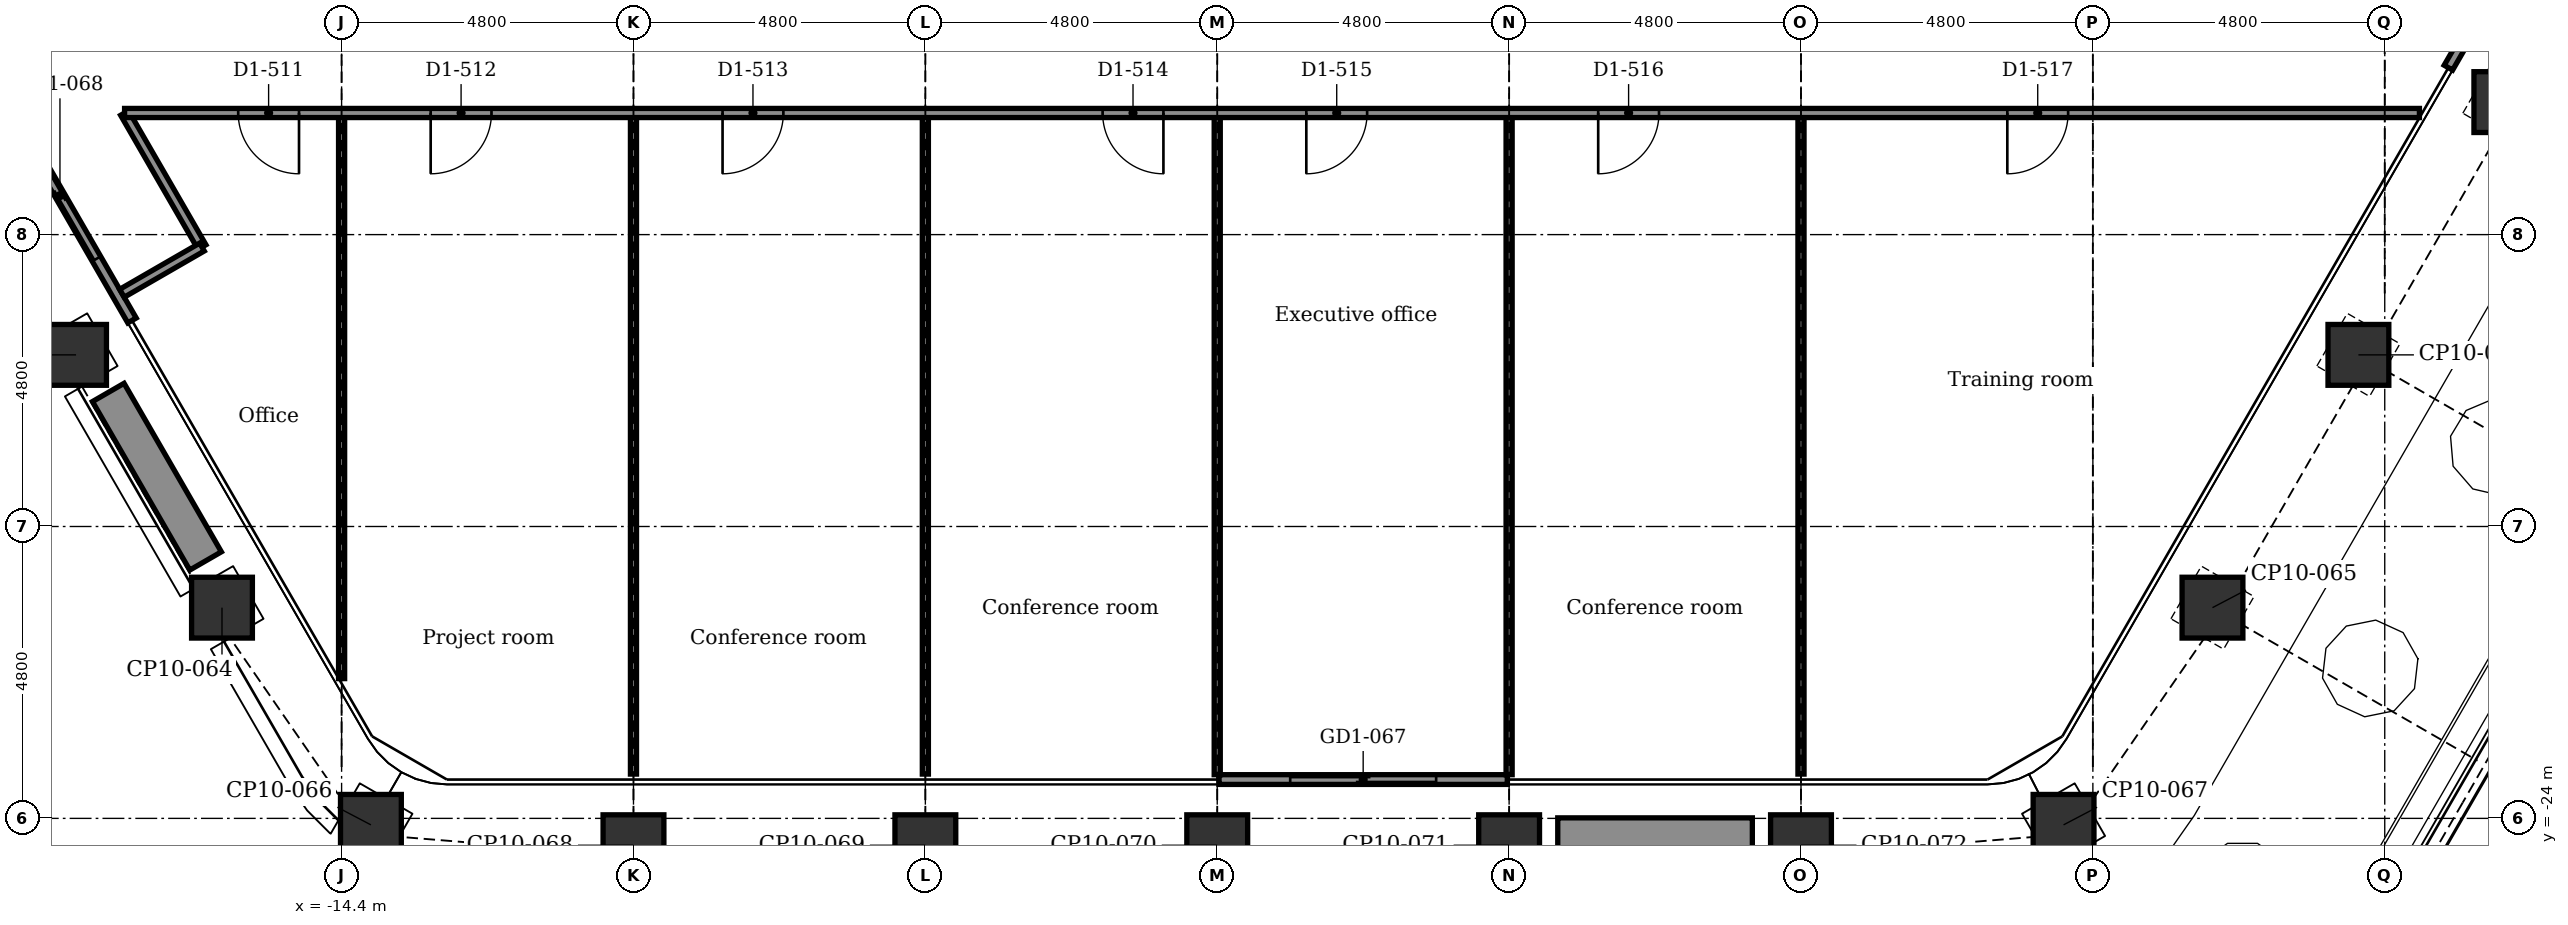
"""IFC4 building model, lengths in metres.
Left out: names, types, materials, properties, quantities, classifications, styles, units other than length and angle.
Written with IfcOpenShell. Run it as: python <this file> out.ifc"""

import sys

from ifc_helpers import new_model, si_unit, direction, frame, frame_2d, origin, origin_2d, place, context, subcontext, project, spatial, rectangle, extrude, element, fill, save


model = new_model("IFC4")
c1 = context("Model", 3, precision=1e-05, world=origin(), true_north=direction((0.0, 1.0)))
c2 = subcontext(c1, "Body", "Model", "MODEL_VIEW")
j1 = project(units=[si_unit("LENGTHUNIT", "METRE"), si_unit("PLANEANGLEUNIT", "RADIAN")], contexts=[c1])
p1 = place(None, origin())
s1 = spatial("IfcSite", under=j1, at=p1, CompositionType="ELEMENT")
p2 = place(p1, origin())
s2 = spatial("IfcBuilding", under=s1, at=p2, CompositionType="ELEMENT")
p3 = place(p2, frame((0.0, 0.0, 181.7)))
s3 = spatial("IfcBuildingStorey", under=s2, at=p3, CompositionType="ELEMENT", Elevation=181.7)
for number, where, z_axis, x_axis in (
    (1, (21.167, -12.221, -0.15), (0.0, 0.0, 1.0), (0.5, 0.866, 0.0)),
    (2, (18.767, -16.378, -0.15), (0.0, 0.0, 1.0), (0.5, 0.866, 0.0)),
    (3, (16.367, -20.535, -0.15), (0.0, 0.0, 1.0), (0.5, 0.866, 0.0)),
    (4, (13.918, -24.107, -0.15), (0.0, 0.0, 1.0), (0.866, 0.5, 0.0)),
    (5, (9.6, -24.442, -0.15), (0.0, 0.0, 1.0), (1.0, 0.0, 0.0)),
    (6, (4.8, -24.442, -0.15), (0.0, 0.0, 1.0), (1.0, 0.0, 0.0)),
    (7, (0.0, -24.442, -0.15), (0.0, 0.0, 1.0), (1.0, 0.0, 0.0)),
    (8, (-4.8, -24.442, -0.15), (0.0, 0.0, 1.0), (1.0, 0.0, 0.0)),
    (9, (-9.6, -24.442, -0.15), (0.0, 0.0, 1.0), (1.0, 0.0, 0.0)),
    (10, (-13.918, -24.107, -0.15), (0.0, 0.0, 1.0), (0.5, 0.866, 0.0)),
    (11, (-16.367, -20.535, -0.15), (0.0, 0.0, 1.0), (0.866, 0.5, 0.0)),
    (12, (-18.767, -16.378, -0.15), (0.0, 0.0, 1.0), (0.866, 0.5, 0.0)),
):
    element("IfcColumn", number, at=place(p3, frame(where, z_axis=z_axis, x_axis=x_axis)), inside=s3, PredefinedType="COLUMN", context=c2, shape_type="SweptSolid", body=[
        extrude(rectangle(XDim=1.0, YDim=1.0, at=origin_2d()), origin(), (0.0, 0.0, 1.0), 3.9),
    ])
p4 = place(p3, frame((22.617, -7.55, 0.0), z_axis=(0.0, 0.0, 1.0), x_axis=(-0.5000167099, -0.866015756104, 0.0)))
e13 = element("IfcWall", 13, at=p4, inside=s3, PredefinedType="PARTITIONING", context=c2, shape_type="SweptSolid", body=[
    extrude(rectangle(XDim=4.74, YDim=0.16, at=frame_2d((2.37, 0.0))), origin(), (0.0, 0.0, 1.0), 3.75),
])
p5 = place(p4, frame((1.17, 0.0, 0.0)))
e14 = element("IfcOpeningElement", 14, at=p5, cuts=e13, PredefinedType="OPENING", context=c2, shape_type="SweptSolid", body=[
    extrude(rectangle(XDim=2.4, YDim=2.4, at=frame_2d((1.2, 1.2))), frame((0.0, 0.09, 0.0), z_axis=(0.0, -1.0, 0.0), x_axis=(1.0, 0.0, 0.0)), (0.0, 0.0, 1.0), 0.18),
])
p6 = place(p3, frame((4.77, -23.362, 0.0), z_axis=(0.0, 0.0, 1.0), x_axis=(-1.0, 0.0, 0.0)))
e15 = element("IfcWall", 15, at=p6, inside=s3, PredefinedType="PARTITIONING", context=c2, shape_type="SweptSolid", body=[
    extrude(rectangle(XDim=4.74, YDim=0.16, at=frame_2d((2.37, 0.0))), origin(), (0.0, 0.0, 1.0), 3.75),
])
p7 = place(p6, frame((1.17, 0.0, 0.0)))
e16 = element("IfcOpeningElement", 16, at=p7, cuts=e15, PredefinedType="OPENING", context=c2, shape_type="SweptSolid", body=[
    extrude(rectangle(XDim=2.4, YDim=2.4, at=frame_2d((1.2, 1.2))), frame((0.0, 0.09, 0.0), z_axis=(0.0, -1.0, 0.0), x_axis=(1.0, 0.0, 0.0)), (0.0, 0.0, 1.0), 0.18),
])
p8 = place(p3, frame((-17.847, -15.812, 0.0), z_axis=(0.0, 0.0, 1.0), x_axis=(-0.5000167099, 0.866015756104, 0.0)))
e17 = element("IfcWall", 17, at=p8, inside=s3, PredefinedType="PARTITIONING", context=c2, shape_type="SweptSolid", body=[
    extrude(rectangle(XDim=4.74, YDim=0.16, at=frame_2d((2.37, 0.0))), origin(), (0.0, 0.0, 1.0), 3.75),
])
p9 = place(p8, frame((1.17, 0.0, 0.0)))
e18 = element("IfcOpeningElement", 18, at=p9, cuts=e17, PredefinedType="OPENING", context=c2, shape_type="SweptSolid", body=[
    extrude(rectangle(XDim=2.4, YDim=2.4, at=frame_2d((1.2, 1.2))), frame((0.0, 0.09, 0.0), z_axis=(0.0, -1.0, 0.0), x_axis=(1.0, 0.0, 0.0)), (0.0, 0.0, 1.0), 0.18),
])
for number, where, z_axis, x_axis in (
    (19, (8.8, -24.292, 0.0), (0.0, 0.0, 1.0), (-1.0, 0.0, 0.0)),
    (20, (-16.637, -19.767, 0.0), (0.0, 0.0, 1.0), (-0.5, 0.866, 0.0)),
):
    element("IfcWall", number, at=place(p3, frame(where, z_axis=z_axis, x_axis=x_axis)), inside=s3, PredefinedType="USERDEFINED", context=c2, shape_type="SweptSolid", body=[
        extrude(rectangle(XDim=3.2, YDim=0.6, at=frame_2d((1.6, 0.0))), origin(), (0.0, 0.0, 1.0), 0.7),
    ])
p10 = place(p3, frame((9.6, -23.271, 0.0), z_axis=(0.0, 0.0, 1.0), x_axis=(0.0, 1.0, 0.0)))
e21 = element("IfcWall", 21, at=p10, inside=s3, PredefinedType="PARTITIONING", context=c2, shape_type="SweptSolid", body=[
    extrude(rectangle(XDim=10.872, YDim=0.1, at=frame_2d((5.436, 0.0))), origin(), (0.0, 0.0, 1.0), 3.066),
])
for number, where, z_axis, x_axis in (
    (22, (4.8, -23.281, 0.0), (0.0, 0.0, 1.0), (0.0, 1.0, 0.0)),
    (23, (0.0, -23.281, 0.0), (0.0, 0.0, 1.0), (0.0, 1.0, 0.0)),
):
    element("IfcWall", number, at=place(p3, frame(where, z_axis=z_axis, x_axis=x_axis)), inside=s3, PredefinedType="PARTITIONING", context=c2, shape_type="SweptSolid", body=[
        extrude(rectangle(XDim=10.882, YDim=0.1, at=frame_2d((5.441, 0.0))), origin(), (0.0, 0.0, 1.0), 3.066),
    ])
for number, where, z_axis, x_axis in (
    (24, (-4.8, -23.271, 0.0), (0.0, 0.0, 1.0), (0.0, 1.0, 0.0)),
    (25, (-9.6, -23.271, 0.0), (0.0, 0.0, 1.0), (0.0, 1.0, 0.0)),
):
    element("IfcWall", number, at=place(p3, frame(where, z_axis=z_axis, x_axis=x_axis)), inside=s3, PredefinedType="PARTITIONING", context=c2, shape_type="SweptSolid", body=[
        extrude(rectangle(XDim=10.872, YDim=0.1, at=frame_2d((5.436, 0.0))), origin(), (0.0, 0.0, 1.0), 3.066),
    ])
p11 = place(p3, frame((-14.4, -21.701, 0.0), z_axis=(0.0, 0.0, 1.0), x_axis=(0.0, 1.0, 0.0)))
e26 = element("IfcWall", 26, at=p11, inside=s3, PredefinedType="PARTITIONING", context=c2, shape_type="SweptSolid", body=[
    extrude(rectangle(XDim=9.302, YDim=0.1, at=frame_2d((4.651, 0.0))), origin(), (0.0, 0.0, 1.0), 3.066),
])
p12 = place(p3, frame((-17.969, -12.4, 0.0), z_axis=(0.0, 0.0, 1.0), x_axis=(0.499996383721, -0.866027491634, 0.0)))
e27 = element("IfcWall", 27, at=p12, inside=s3, PredefinedType="PARTITIONING", context=c2, shape_type="SweptSolid", body=[
    extrude(rectangle(XDim=2.546, YDim=0.15, at=frame_2d((1.273, 0.0))), origin(), (0.0, 0.0, 1.0), 3.75),
])
p13 = place(p3, frame((-18.012, -15.365, 0.0), z_axis=(0.0, 0.0, 1.0), x_axis=(0.866030456496, 0.499991248344, 0.0)))
e28 = element("IfcWall", 28, at=p13, inside=s3, PredefinedType="PARTITIONING", context=c2, shape_type="SweptSolid", body=[
    extrude(rectangle(XDim=1.52, YDim=0.15, at=frame_2d((0.76, 0.0))), origin(), (0.0, 0.0, 1.0), 3.75),
])
p14 = place(p3, frame((-17.969, -12.4, 0.0), z_axis=(0.0, 0.0, 1.0), x_axis=(1.0, 0.0, 0.0)))
e29 = element("IfcWall", 29, at=p14, inside=s3, PredefinedType="PARTITIONING", context=c2, shape_type="SweptSolid", body=[
    extrude(rectangle(XDim=37.739, YDim=0.15, at=frame_2d((18.87, 0.0))), origin(), (0.0, 0.0, 1.0), 3.75),
])
p15 = place(p14, frame((1.869, 0.0, 0.0)))
e30 = element("IfcOpeningElement", 30, at=p15, cuts=e29, PredefinedType="OPENING", context=c2, shape_type="SweptSolid", body=[
    extrude(rectangle(XDim=1.0, YDim=2.1, at=frame_2d((0.5, 1.05))), frame((0.0, 0.085, 0.0), z_axis=(0.0, -1.0, 0.0), x_axis=(1.0, 0.0, 0.0)), (0.0, 0.0, 1.0), 0.17),
])
p16 = place(p14, frame((5.034, 0.0, 0.0)))
e31 = element("IfcOpeningElement", 31, at=p16, cuts=e29, PredefinedType="OPENING", context=c2, shape_type="SweptSolid", body=[
    extrude(rectangle(XDim=1.0, YDim=2.1, at=frame_2d((0.5, 1.05))), frame((0.0, 0.085, 0.0), z_axis=(0.0, -1.0, 0.0), x_axis=(1.0, 0.0, 0.0)), (0.0, 0.0, 1.0), 0.17),
])
p17 = place(p14, frame((9.834, 0.0, 0.0)))
e32 = element("IfcOpeningElement", 32, at=p17, cuts=e29, PredefinedType="OPENING", context=c2, shape_type="SweptSolid", body=[
    extrude(rectangle(XDim=1.0, YDim=2.1, at=frame_2d((0.5, 1.05))), frame((0.0, 0.085, 0.0), z_axis=(0.0, -1.0, 0.0), x_axis=(1.0, 0.0, 0.0)), (0.0, 0.0, 1.0), 0.17),
])
p18 = place(p14, frame((16.084, 0.0, 0.0)))
e33 = element("IfcOpeningElement", 33, at=p18, cuts=e29, PredefinedType="OPENING", context=c2, shape_type="SweptSolid", body=[
    extrude(rectangle(XDim=1.0, YDim=2.1, at=frame_2d((0.5, 1.05))), frame((0.0, 0.085, 0.0), z_axis=(0.0, -1.0, 0.0), x_axis=(1.0, 0.0, 0.0)), (0.0, 0.0, 1.0), 0.17),
])
p19 = place(p14, frame((19.434, 0.0, 0.0)))
e34 = element("IfcOpeningElement", 34, at=p19, cuts=e29, PredefinedType="OPENING", context=c2, shape_type="SweptSolid", body=[
    extrude(rectangle(XDim=1.0, YDim=2.1, at=frame_2d((0.5, 1.05))), frame((0.0, 0.085, 0.0), z_axis=(0.0, -1.0, 0.0), x_axis=(1.0, 0.0, 0.0)), (0.0, 0.0, 1.0), 0.17),
])
p20 = place(p14, frame((24.234, 0.0, 0.0)))
e35 = element("IfcOpeningElement", 35, at=p20, cuts=e29, PredefinedType="OPENING", context=c2, shape_type="SweptSolid", body=[
    extrude(rectangle(XDim=1.0, YDim=2.1, at=frame_2d((0.5, 1.05))), frame((0.0, 0.085, 0.0), z_axis=(0.0, -1.0, 0.0), x_axis=(1.0, 0.0, 0.0)), (0.0, 0.0, 1.0), 0.17),
])
p21 = place(p14, frame((30.962, 0.0, 0.0)))
e36 = element("IfcOpeningElement", 36, at=p21, cuts=e29, PredefinedType="OPENING", context=c2, shape_type="SweptSolid", body=[
    extrude(rectangle(XDim=1.0, YDim=2.1, at=frame_2d((0.5, 1.05))), frame((0.0, 0.085, 0.0), z_axis=(0.0, -1.0, 0.0), x_axis=(1.0, 0.0, 0.0)), (0.0, 0.0, 1.0), 0.17),
])
p22 = place(p7, origin())
e37 = element("IfcDoor", 37, at=p22, inside=s3, OperationType="DOUBLE_DOOR_SLIDING", PredefinedType="DOOR", context=c2, shape_type="SweptSolid", body=[
    extrude(rectangle(XDim=2.4, YDim=2.4, at=frame_2d((1.2, 1.2))), frame((0.0, 0.025, 0.0), z_axis=(0.0, -1.0, 0.0), x_axis=(1.0, 0.0, 0.0)), (0.0, 0.0, 1.0), 0.05),
])
fill(e16, e37)
p23 = place(p9, origin())
e38 = element("IfcDoor", 38, at=p23, inside=s3, OperationType="DOUBLE_DOOR_SLIDING", PredefinedType="DOOR", context=c2, shape_type="SweptSolid", body=[
    extrude(rectangle(XDim=2.4, YDim=2.4, at=frame_2d((1.2, 1.2))), frame((0.0, 0.025, 0.0), z_axis=(0.0, -1.0, 0.0), x_axis=(1.0, 0.0, 0.0)), (0.0, 0.0, 1.0), 0.05),
])
fill(e18, e38)
p24 = place(p15, frame((1.0, 0.0, 0.0), z_axis=(0.0, 0.0, 1.0), x_axis=(-1.0, 0.0, 0.0)))
e39 = element("IfcDoor", 39, at=p24, inside=s3, OperationType="SINGLE_SWING_RIGHT", PredefinedType="DOOR", context=c2, shape_type="SweptSolid", body=[
    extrude(rectangle(XDim=1.0, YDim=2.1, at=frame_2d((0.5, 1.05))), frame((0.0, 0.025, 0.0), z_axis=(0.0, -1.0, 0.0), x_axis=(1.0, 0.0, 0.0)), (0.0, 0.0, 1.0), 0.05),
])
fill(e30, e39)
p25 = place(p16, frame((1.0, 0.0, 0.0), z_axis=(0.0, 0.0, 1.0), x_axis=(-1.0, 0.0, 0.0)))
e40 = element("IfcDoor", 40, at=p25, inside=s3, OperationType="SINGLE_SWING_LEFT", PredefinedType="DOOR", context=c2, shape_type="SweptSolid", body=[
    extrude(rectangle(XDim=1.0, YDim=2.1, at=frame_2d((0.5, 1.05))), frame((0.0, 0.025, 0.0), z_axis=(0.0, -1.0, 0.0), x_axis=(1.0, 0.0, 0.0)), (0.0, 0.0, 1.0), 0.05),
])
fill(e31, e40)
p26 = place(p17, frame((1.0, 0.0, 0.0), z_axis=(0.0, 0.0, 1.0), x_axis=(-1.0, 0.0, 0.0)))
e41 = element("IfcDoor", 41, at=p26, inside=s3, OperationType="SINGLE_SWING_LEFT", PredefinedType="DOOR", context=c2, shape_type="SweptSolid", body=[
    extrude(rectangle(XDim=1.0, YDim=2.1, at=frame_2d((0.5, 1.05))), frame((0.0, 0.025, 0.0), z_axis=(0.0, -1.0, 0.0), x_axis=(1.0, 0.0, 0.0)), (0.0, 0.0, 1.0), 0.05),
])
fill(e32, e41)
p27 = place(p18, frame((1.0, 0.0, 0.0), z_axis=(0.0, 0.0, 1.0), x_axis=(-1.0, 0.0, 0.0)))
e42 = element("IfcDoor", 42, at=p27, inside=s3, OperationType="SINGLE_SWING_RIGHT", PredefinedType="DOOR", context=c2, shape_type="SweptSolid", body=[
    extrude(rectangle(XDim=1.0, YDim=2.1, at=frame_2d((0.5, 1.05))), frame((0.0, 0.025, 0.0), z_axis=(0.0, -1.0, 0.0), x_axis=(1.0, 0.0, 0.0)), (0.0, 0.0, 1.0), 0.05),
])
fill(e33, e42)
p28 = place(p19, frame((1.0, 0.0, 0.0), z_axis=(0.0, 0.0, 1.0), x_axis=(-1.0, 0.0, 0.0)))
e43 = element("IfcDoor", 43, at=p28, inside=s3, OperationType="SINGLE_SWING_LEFT", PredefinedType="DOOR", context=c2, shape_type="SweptSolid", body=[
    extrude(rectangle(XDim=1.0, YDim=2.1, at=frame_2d((0.5, 1.05))), frame((0.0, 0.025, 0.0), z_axis=(0.0, -1.0, 0.0), x_axis=(1.0, 0.0, 0.0)), (0.0, 0.0, 1.0), 0.05),
])
fill(e34, e43)
p29 = place(p20, frame((1.0, 0.0, 0.0), z_axis=(0.0, 0.0, 1.0), x_axis=(-1.0, 0.0, 0.0)))
e44 = element("IfcDoor", 44, at=p29, inside=s3, OperationType="SINGLE_SWING_LEFT", PredefinedType="DOOR", context=c2, shape_type="SweptSolid", body=[
    extrude(rectangle(XDim=1.0, YDim=2.1, at=frame_2d((0.5, 1.05))), frame((0.0, 0.025, 0.0), z_axis=(0.0, -1.0, 0.0), x_axis=(1.0, 0.0, 0.0)), (0.0, 0.0, 1.0), 0.05),
])
fill(e35, e44)
p30 = place(p21, frame((1.0, 0.0, 0.0), z_axis=(0.0, 0.0, 1.0), x_axis=(-1.0, 0.0, 0.0)))
e45 = element("IfcDoor", 45, at=p30, inside=s3, OperationType="SINGLE_SWING_LEFT", PredefinedType="DOOR", context=c2, shape_type="SweptSolid", body=[
    extrude(rectangle(XDim=1.0, YDim=2.1, at=frame_2d((0.5, 1.05))), frame((0.0, 0.025, 0.0), z_axis=(0.0, -1.0, 0.0), x_axis=(1.0, 0.0, 0.0)), (0.0, 0.0, 1.0), 0.05),
])
fill(e36, e45)
save(model, sys.argv[1])
